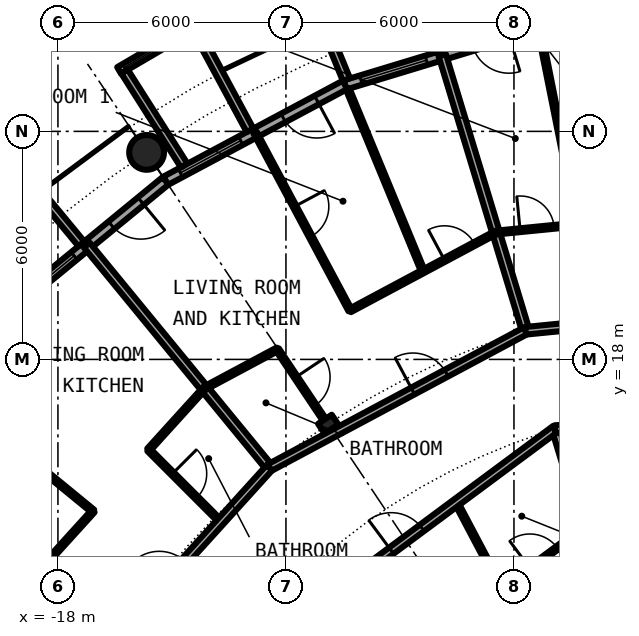
"""IFC4 building model, lengths in metres.
Left out: names, types, materials, properties, quantities, classifications, styles, units other than length and angle.
Written with IfcOpenShell. Run it as: python <this file> out.ifc"""

import sys

from ifc_helpers import new_model, si_unit, direction, frame, frame_2d, origin, origin_2d, place, context, subcontext, project, spatial, rectangle, circle, hollow_circle, i_section, extrude, element, fill, save


model = new_model("IFC4")
c1 = context("Model", 3, precision=1e-05, world=origin(), true_north=direction((0.0, 1.0)))
c2 = subcontext(c1, "Body", "Model", "MODEL_VIEW")
j1 = project(units=[si_unit("LENGTHUNIT", "METRE"), si_unit("PLANEANGLEUNIT", "RADIAN")], contexts=[c1])
p1 = place(None, origin())
s1 = spatial("IfcSite", under=j1, at=p1, CompositionType="ELEMENT")
p2 = place(p1, origin())
s2 = spatial("IfcBuilding", under=s1, at=p2, CompositionType="ELEMENT")
p3 = place(p2, frame((0.0, 0.0, 123.85)))
s3 = spatial("IfcBuildingStorey", under=s2, at=p3, CompositionType="ELEMENT", Elevation=123.85)
p4 = place(p3, frame((-15.667, 23.448, 0.0), z_axis=(0.0, 0.0, 1.0), x_axis=(1.0, 0.0, 0.0)))
e1 = element("IfcColumn", 1, at=p4, inside=s3, PredefinedType="COLUMN", context=c2, shape_type="SweptSolid", body=[
    extrude(hollow_circle(Radius=0.457, WallThickness=0.04, at=origin_2d()), origin(), (0.0, 0.0, 1.0), 3.05),
])
p5 = place(p3, frame((-10.889, 16.297, 0.0), z_axis=(0.0, 0.0, 1.0), x_axis=(-0.55557023302, 0.831469612303, 0.0)))
e2 = element("IfcColumn", 2, at=p5, inside=s3, PredefinedType="COLUMN", context=c2, shape_type="SweptSolid", body=[
    extrude(i_section(OverallWidth=0.307, OverallDepth=0.432, WebThickness=0.021, FlangeThickness=0.04, FilletRadius=0.027, at=origin_2d()), origin(), (0.0, 0.0, 1.0), 3.05),
])
p6 = place(p3, frame((-5.326, 26.775, 0.0), z_axis=(0.0, 0.0, 1.0), x_axis=(-0.956965678721, -0.290201119486, 0.0)))
e3 = element("IfcWall", 3, at=p6, inside=s3, PredefinedType="SOLIDWALL", context=c2, shape_type="SweptSolid", body=[
    extrude(rectangle(XDim=5.351, YDim=0.25, at=frame_2d((2.676, 0.0))), origin(), (0.0, 0.0, 1.0), 2.7),
])
p7 = place(p6, frame((0.841, 0.0, 0.0)))
e4 = element("IfcOpeningElement", 4, at=p7, cuts=e3, PredefinedType="OPENING", context=c2, shape_type="SweptSolid", body=[
    extrude(rectangle(XDim=1.0, YDim=2.2, at=frame_2d((0.5, 1.1))), frame((0.0, 0.135, 0.0), z_axis=(0.0, -1.0, 0.0), x_axis=(1.0, 0.0, 0.0)), (0.0, 0.0, 1.0), 0.27),
])
p8 = place(p6, frame((3.111, 0.0, 0.3)))
e5 = element("IfcOpeningElement", 5, at=p8, cuts=e3, PredefinedType="OPENING", context=c2, shape_type="SweptSolid", body=[
    extrude(rectangle(XDim=1.8, YDim=2.1, at=frame_2d((0.9, 1.05))), frame((0.0, 0.135, 0.0), z_axis=(0.0, -1.0, 0.0), x_axis=(1.0, 0.0, 0.0)), (0.0, 0.0, 1.0), 0.27),
])
p9 = place(p3, frame((-8.009, 26.092, -0.03), z_axis=(0.0, 0.0, 1.0), x_axis=(-0.293406695073, 0.955987715029, 0.0)))
e6 = element("IfcWall", 6, at=p9, inside=s3, PredefinedType="SOLIDWALL", context=c2, shape_type="SweptSolid", body=[
    extrude(rectangle(XDim=3.006, YDim=0.2, at=frame_2d((1.503, 0.0))), origin(), (0.0, 0.0, 1.0), 2.73),
])
p10 = place(p3, frame((-10.409, 25.364, -0.03), z_axis=(0.0, 0.0, 1.0), x_axis=(-0.379509886562, 0.925187681501, 0.0)))
e7 = element("IfcWall", 7, at=p10, inside=s3, PredefinedType="SOLIDWALL", context=c2, shape_type="SweptSolid", body=[
    extrude(rectangle(XDim=2.883, YDim=0.2, at=frame_2d((1.441, 0.0))), origin(), (0.0, 0.0, 1.0), 2.73),
])
p11 = place(p3, frame((-10.447, 25.222, 0.0), z_axis=(0.0, 0.0, 1.0), x_axis=(-0.881915646801, -0.471407246368, 0.0)))
e8 = element("IfcWall", 8, at=p11, inside=s3, PredefinedType="SOLIDWALL", context=c2, shape_type="SweptSolid", body=[
    extrude(rectangle(XDim=5.352, YDim=0.25, at=frame_2d((2.676, 0.0))), origin(), (0.0, 0.0, 1.0), 2.7),
])
p12 = place(p11, frame((0.841, 0.0, 0.0)))
e9 = element("IfcOpeningElement", 9, at=p12, cuts=e8, PredefinedType="OPENING", context=c2, shape_type="SweptSolid", body=[
    extrude(rectangle(XDim=1.0, YDim=2.2, at=frame_2d((0.5, 1.1))), frame((0.0, 0.135, 0.0), z_axis=(0.0, -1.0, 0.0), x_axis=(1.0, 0.0, 0.0)), (0.0, 0.0, 1.0), 0.27),
])
p13 = place(p11, frame((3.111, 0.0, 0.3)))
e10 = element("IfcOpeningElement", 10, at=p13, cuts=e8, PredefinedType="OPENING", context=c2, shape_type="SweptSolid", body=[
    extrude(rectangle(XDim=1.8, YDim=2.1, at=frame_2d((0.9, 1.05))), frame((0.0, 0.135, 0.0), z_axis=(0.0, -1.0, 0.0), x_axis=(1.0, 0.0, 0.0)), (0.0, 0.0, 1.0), 0.27),
])
p14 = place(p3, frame((-14.327, 26.812, -0.03), z_axis=(0.0, 0.0, 1.0), x_axis=(-0.862762477128, -0.505609442218, 0.0)))
e11 = element("IfcWall", 11, at=p14, inside=s3, PredefinedType="SOLIDWALL", context=c2, shape_type="SweptSolid", body=[
    extrude(rectangle(XDim=2.391, YDim=0.2, at=frame_2d((1.196, 0.0))), origin(), (0.0, 0.0, 1.0), 2.73),
])
p15 = place(p14, frame((0.156, 0.0, 0.33)))
e12 = element("IfcOpeningElement", 12, at=p15, cuts=e11, PredefinedType="OPENING", context=c2, shape_type="SweptSolid", body=[
    extrude(circle(Radius=1.04, at=frame_2d((1.04, 1.04))), frame((0.0, 0.11, 0.0), z_axis=(0.0, -1.0, 0.0), x_axis=(1.0, 0.0, 0.0)), (0.0, 0.0, 1.0), 0.22),
])
p16 = place(p3, frame((-12.945, 24.029, -0.03), z_axis=(0.0, 0.0, 1.0), x_axis=(-0.474424310775, 0.88029629861, 0.0)))
e13 = element("IfcWall", 13, at=p16, inside=s3, PredefinedType="SOLIDWALL", context=c2, shape_type="SweptSolid", body=[
    extrude(rectangle(XDim=3.006, YDim=0.2, at=frame_2d((1.503, 0.0))), origin(), (0.0, 0.0, 1.0), 2.73),
])
p17 = place(p3, frame((-14.678, 23.102, -0.03), z_axis=(0.0, 0.0, 1.0), x_axis=(-0.536001536573, 0.844217005746, 0.0)))
e14 = element("IfcWall", 14, at=p17, inside=s3, PredefinedType="SOLIDWALL", context=c2, shape_type="SweptSolid", body=[
    extrude(rectangle(XDim=2.929, YDim=0.2, at=frame_2d((1.465, 0.0))), origin(), (0.0, 0.0, 1.0), 2.73),
])
p18 = place(p3, frame((-15.167, 22.699, 0.0), z_axis=(0.0, 0.0, 1.0), x_axis=(-0.773019449054, -0.634382322723, 0.0)))
e15 = element("IfcWall", 15, at=p18, inside=s3, PredefinedType="SOLIDWALL", context=c2, shape_type="SweptSolid", body=[
    extrude(rectangle(XDim=5.352, YDim=0.25, at=frame_2d((2.676, 0.0))), origin(), (0.0, 0.0, 1.0), 2.7),
])
p19 = place(p18, frame((0.841, 0.0, 0.0)))
e16 = element("IfcOpeningElement", 16, at=p19, cuts=e15, PredefinedType="OPENING", context=c2, shape_type="SweptSolid", body=[
    extrude(rectangle(XDim=1.0, YDim=2.2, at=frame_2d((0.5, 1.1))), frame((0.0, 0.135, 0.0), z_axis=(0.0, -1.0, 0.0), x_axis=(1.0, 0.0, 0.0)), (0.0, 0.0, 1.0), 0.27),
])
p20 = place(p18, frame((3.111, 0.0, 0.3)))
e17 = element("IfcOpeningElement", 17, at=p20, cuts=e15, PredefinedType="OPENING", context=c2, shape_type="SweptSolid", body=[
    extrude(rectangle(XDim=1.8, YDim=2.1, at=frame_2d((0.9, 1.05))), frame((0.0, 0.135, 0.0), z_axis=(0.0, -1.0, 0.0), x_axis=(1.0, 0.0, 0.0)), (0.0, 0.0, 1.0), 0.27),
])
p21 = place(p3, frame((-17.384, 21.041, -0.03), z_axis=(0.0, 0.0, 1.0), x_axis=(-0.63709551667, 0.770784861449, 0.0)))
e18 = element("IfcWall", 18, at=p21, inside=s3, PredefinedType="SOLIDWALL", context=c2, shape_type="SweptSolid", body=[
    extrude(rectangle(XDim=3.006, YDim=0.2, at=frame_2d((1.503, 0.0))), origin(), (0.0, 0.0, 1.0), 2.73),
])
p22 = place(p3, frame((-7.887, 26.005, 0.0), z_axis=(0.0, 0.0, 1.0), x_axis=(0.29005838641, -0.957008951094, 0.0)))
e19 = element("IfcWall", 19, at=p22, inside=s3, PredefinedType="PARTITIONING", context=c2, shape_type="SweptSolid", body=[
    extrude(rectangle(XDim=7.574, YDim=0.2, at=frame_2d((3.787, 0.0))), origin(), (0.0, 0.0, 1.0), 2.7),
])
p23 = place(p3, frame((-4.907, 16.172, 0.0), z_axis=(0.0, 0.0, 1.0), x_axis=(0.289977130626, -0.957033575019, 0.0)))
e20 = element("IfcWall", 20, at=p23, inside=s3, PredefinedType="PARTITIONING", context=c2, shape_type="SweptSolid", body=[
    extrude(rectangle(XDim=9.18, YDim=0.2, at=frame_2d((4.59, 0.0))), origin(), (0.0, 0.0, 1.0), 2.7),
])
p24 = place(p3, frame((-22.595, 15.098, 0.0), z_axis=(0.0, 0.0, 1.0), x_axis=(0.831406593008, -0.555664536482, 0.0)))
e21 = element("IfcWall", 21, at=p24, inside=s3, PredefinedType="PARTITIONING", context=c2, shape_type="SweptSolid", body=[
    extrude(rectangle(XDim=7.358, YDim=0.2, at=frame_2d((3.679, 0.0))), origin(), (0.0, 0.0, 1.0), 2.7),
])
p25 = place(p3, frame((-21.012, 17.233, 0.0), z_axis=(0.0, 0.0, 1.0), x_axis=(0.77326214499, -0.634086472908, 0.0)))
e22 = element("IfcWall", 22, at=p25, inside=s3, PredefinedType="PARTITIONING", context=c2, shape_type="SweptSolid", body=[
    extrude(rectangle(XDim=5.089, YDim=0.1, at=frame_2d((2.544, 0.0))), origin(), (0.0, 0.0, 1.0), 2.7),
])
p26 = place(p25, frame((2.094, 0.0, 0.0)))
e23 = element("IfcOpeningElement", 23, at=p26, cuts=e22, PredefinedType="OPENING", context=c2, shape_type="SweptSolid", body=[
    extrude(rectangle(XDim=0.9, YDim=2.3, at=frame_2d((0.45, 1.15))), frame((0.0, 0.06, 0.0), z_axis=(0.0, -1.0, 0.0), x_axis=(1.0, 0.0, 0.0)), (0.0, 0.0, 1.0), 0.12),
])
p27 = place(p3, frame((-17.24, 21.007, 0.0), z_axis=(0.0, 0.0, 1.0), x_axis=(0.634381303318, -0.773020285633, 0.0)))
e24 = element("IfcWall", 24, at=p27, inside=s3, PredefinedType="PARTITIONING", context=c2, shape_type="SweptSolid", body=[
    extrude(rectangle(XDim=7.576, YDim=0.2, at=frame_2d((3.788, 0.0))), origin(), (0.0, 0.0, 1.0), 2.7),
])
p28 = place(p3, frame((-15.612, 15.622, 0.0), z_axis=(0.0, 0.0, 1.0), x_axis=(0.706741540154, -0.707471833659, 0.0)))
e25 = element("IfcWall", 25, at=p28, inside=s3, PredefinedType="PARTITIONING", context=c2, shape_type="SweptSolid", body=[
    extrude(rectangle(XDim=2.674, YDim=0.1, at=frame_2d((1.337, 0.0))), origin(), (0.0, 0.0, 1.0), 2.7),
])
p29 = place(p28, frame((0.887, 0.0, 0.0)))
e26 = element("IfcOpeningElement", 26, at=p29, cuts=e25, PredefinedType="OPENING", context=c2, shape_type="SweptSolid", body=[
    extrude(rectangle(XDim=0.9, YDim=2.3, at=frame_2d((0.45, 1.15))), frame((0.0, 0.06, 0.0), z_axis=(0.0, -1.0, 0.0), x_axis=(1.0, 0.0, 0.0)), (0.0, 0.0, 1.0), 0.12),
])
p30 = place(p3, frame((-12.81, 23.966, 0.0), z_axis=(0.0, 0.0, 1.0), x_axis=(0.47140999111, -0.881914179658, 0.0)))
e27 = element("IfcWall", 27, at=p30, inside=s3, PredefinedType="PARTITIONING", context=c2, shape_type="SweptSolid", body=[
    extrude(rectangle(XDim=5.303, YDim=0.1, at=frame_2d((2.652, 0.0))), origin(), (0.0, 0.0, 1.0), 2.7),
])
p31 = place(p30, frame((2.202, 0.0, 0.0)))
e28 = element("IfcOpeningElement", 28, at=p31, cuts=e27, PredefinedType="OPENING", context=c2, shape_type="SweptSolid", body=[
    extrude(rectangle(XDim=0.9, YDim=2.3, at=frame_2d((0.45, 1.15))), frame((0.0, 0.06, 0.0), z_axis=(0.0, -1.0, 0.0), x_axis=(1.0, 0.0, 0.0)), (0.0, 0.0, 1.0), 0.12),
])
p32 = place(p3, frame((-12.229, 18.264, 0.0), z_axis=(0.0, 0.0, 1.0), x_axis=(0.556469477731, -0.830868052313, 0.0)))
e29 = element("IfcWall", 29, at=p32, inside=s3, PredefinedType="PARTITIONING", context=c2, shape_type="SweptSolid", body=[
    extrude(rectangle(XDim=2.164, YDim=0.1, at=frame_2d((1.082, 0.0))), origin(), (0.0, 0.0, 1.0), 2.7),
])
p33 = place(p32, frame((0.881, 0.0, 0.0)))
e30 = element("IfcOpeningElement", 30, at=p33, cuts=e29, PredefinedType="OPENING", context=c2, shape_type="SweptSolid", body=[
    extrude(rectangle(XDim=0.9, YDim=2.3, at=frame_2d((0.45, 1.15))), frame((0.0, 0.06, 0.0), z_axis=(0.0, -1.0, 0.0), x_axis=(1.0, 0.0, 0.0)), (0.0, 0.0, 1.0), 0.12),
])
p34 = place(p3, frame((-10.375, 25.116, 0.0), z_axis=(0.0, 0.0, 1.0), x_axis=(0.381673756215, -0.924297107978, 0.0)))
e31 = element("IfcWall", 31, at=p34, inside=s3, PredefinedType="PARTITIONING", context=c2, shape_type="SweptSolid", body=[
    extrude(rectangle(XDim=5.195, YDim=0.1, at=frame_2d((2.598, 0.0))), origin(), (0.0, 0.0, 1.0), 2.7),
])
p35 = place(p3, frame((-7.519, 14.234, 0.0), z_axis=(0.0, 0.0, 1.0), x_axis=(0.467001992543, -0.884256263173, 0.0)))
e32 = element("IfcWall", 32, at=p35, inside=s3, PredefinedType="PARTITIONING", context=c2, shape_type="SweptSolid", body=[
    extrude(rectangle(XDim=2.572, YDim=0.1, at=frame_2d((1.286, 0.0))), origin(), (0.0, 0.0, 1.0), 2.7),
])
p36 = place(p3, frame((-5.327, 26.648, 0.0), z_axis=(0.0, 0.0, 1.0), x_axis=(0.195899255693, -0.980624026638, 0.0)))
e33 = element("IfcWall", 33, at=p36, inside=s3, PredefinedType="PARTITIONING", context=c2, shape_type="SweptSolid", body=[
    extrude(rectangle(XDim=5.196, YDim=0.1, at=frame_2d((2.598, 0.0))), origin(), (0.0, 0.0, 1.0), 2.7),
])
p37 = place(p3, frame((-6.318, 11.96, 0.0), z_axis=(0.0, 0.0, 1.0), x_axis=(0.803128348509, 0.595806055542, 0.0)))
e34 = element("IfcWall", 34, at=p37, inside=s3, PredefinedType="PARTITIONING", context=c2, shape_type="SweptSolid", body=[
    extrude(rectangle(XDim=2.734, YDim=0.1, at=frame_2d((1.367, 0.0))), origin(), (0.0, 0.0, 1.0), 2.7),
])
p38 = place(p37, frame((0.917, 0.0, 0.0)))
e35 = element("IfcOpeningElement", 35, at=p38, cuts=e34, PredefinedType="OPENING", context=c2, shape_type="SweptSolid", body=[
    extrude(rectangle(XDim=0.9, YDim=2.3, at=frame_2d((0.45, 1.15))), frame((0.0, 0.06, 0.0), z_axis=(0.0, -1.0, 0.0), x_axis=(1.0, 0.0, 0.0)), (0.0, 0.0, 1.0), 0.12),
])
p39 = place(p3, frame((-12.745, 10.358, 0.0), z_axis=(0.0, 0.0, 1.0), x_axis=(0.803191461888, 0.595720971219, 0.0)))
e36 = element("IfcWall", 36, at=p39, inside=s3, PredefinedType="PARTITIONING", context=c2, shape_type="SweptSolid", body=[
    extrude(rectangle(XDim=9.76, YDim=0.2, at=frame_2d((4.88, 0.0))), origin(), (0.0, 0.0, 1.0), 2.7),
])
p40 = place(p39, frame((4.38, 0.0, 0.0)))
e37 = element("IfcOpeningElement", 37, at=p40, cuts=e36, PredefinedType="OPENING", context=c2, shape_type="SweptSolid", body=[
    extrude(rectangle(XDim=1.0, YDim=2.3, at=frame_2d((0.5, 1.15))), frame((0.0, 0.11, 0.0), z_axis=(0.0, -1.0, 0.0), x_axis=(1.0, 0.0, 0.0)), (0.0, 0.0, 1.0), 0.22),
])
p41 = place(p3, frame((-4.921, 16.167, 0.0), z_axis=(0.0, 0.0, 1.0), x_axis=(0.998754043059, 0.049903521659, 0.0)))
e38 = element("IfcWall", 38, at=p41, inside=s3, PredefinedType="PARTITIONING", context=c2, shape_type="SweptSolid", body=[
    extrude(rectangle(XDim=8.214, YDim=0.2, at=frame_2d((4.107, 0.0))), origin(), (0.0, 0.0, 1.0), 2.7),
])
p42 = place(p41, frame((3.614, 0.0, 0.0)))
e39 = element("IfcOpeningElement", 39, at=p42, cuts=e38, PredefinedType="OPENING", context=c2, shape_type="SweptSolid", body=[
    extrude(rectangle(XDim=1.0, YDim=2.3, at=frame_2d((0.5, 1.15))), frame((0.0, 0.11, 0.0), z_axis=(0.0, -1.0, 0.0), x_axis=(1.0, 0.0, 0.0)), (0.0, 0.0, 1.0), 0.22),
])
p43 = place(p3, frame((-12.434, 15.151, 0.0), z_axis=(0.0, 0.0, 1.0), x_axis=(0.8819312112, 0.471378127104, 0.0)))
e40 = element("IfcWall", 40, at=p43, inside=s3, PredefinedType="PARTITIONING", context=c2, shape_type="SweptSolid", body=[
    extrude(rectangle(XDim=7.65, YDim=0.2, at=frame_2d((3.825, 0.0))), origin(), (0.0, 0.0, 1.0), 2.39),
])
p44 = place(p43, frame((4.279, 0.0, 0.0)))
e41 = element("IfcOpeningElement", 41, at=p44, cuts=e40, PredefinedType="OPENING", context=c2, shape_type="SweptSolid", body=[
    extrude(rectangle(XDim=1.0, YDim=2.3, at=frame_2d((0.5, 1.15))), frame((0.0, 0.11, 0.0), z_axis=(0.0, -1.0, 0.0), x_axis=(1.0, 0.0, 0.0)), (0.0, 0.0, 1.0), 0.22),
])
p45 = place(p3, frame((-5.696, 18.753, 0.0), z_axis=(0.0, 0.0, 1.0), x_axis=(0.995146797279, 0.098401483048, 0.0)))
e42 = element("IfcWall", 42, at=p45, inside=s3, PredefinedType="PARTITIONING", context=c2, shape_type="SweptSolid", body=[
    extrude(rectangle(XDim=7.654, YDim=0.2, at=frame_2d((3.827, 0.0))), origin(), (0.0, 0.0, 1.0), 2.39),
])
p46 = place(p45, frame((2.556, 0.0, 0.0)))
e43 = element("IfcOpeningElement", 43, at=p46, cuts=e42, PredefinedType="OPENING", context=c2, shape_type="SweptSolid", body=[
    extrude(rectangle(XDim=1.0, YDim=2.3, at=frame_2d((0.5, 1.15))), frame((0.0, 0.11, 0.0), z_axis=(0.0, -1.0, 0.0), x_axis=(1.0, 0.0, 0.0)), (0.0, 0.0, 1.0), 0.22),
])
p47 = place(p3, frame((-16.192, 11.004, 0.0), z_axis=(0.0, 0.0, 1.0), x_axis=(0.671481997275, 0.741020868354, 0.0)))
e44 = element("IfcWall", 44, at=p47, inside=s3, PredefinedType="PARTITIONING", context=c2, shape_type="SweptSolid", body=[
    extrude(rectangle(XDim=5.596, YDim=0.2, at=frame_2d((2.798, 0.0))), origin(), (0.0, 0.0, 1.0), 2.39),
])
p48 = place(p47, frame((1.277, 0.0, 0.0)))
e45 = element("IfcOpeningElement", 45, at=p48, cuts=e44, PredefinedType="OPENING", context=c2, shape_type="SweptSolid", body=[
    extrude(rectangle(XDim=1.0, YDim=2.3, at=frame_2d((0.5, 1.15))), frame((0.0, 0.11, 0.0), z_axis=(0.0, -1.0, 0.0), x_axis=(1.0, 0.0, 0.0)), (0.0, 0.0, 1.0), 0.22),
])
p49 = place(p3, frame((-14.141, 17.241, 0.0), z_axis=(0.0, 0.0, 1.0), x_axis=(0.881765102974, 0.47168877788, 0.0)))
e46 = element("IfcWall", 46, at=p49, inside=s3, PredefinedType="PARTITIONING", context=c2, shape_type="SweptSolid", body=[
    extrude(rectangle(XDim=2.176, YDim=0.1, at=frame_2d((1.088, 0.0))), origin(), (0.0, 0.0, 1.0), 2.7),
])
p50 = place(p3, frame((-10.312, 19.288, 0.0), z_axis=(0.0, 0.0, 1.0), x_axis=(0.881932070463, 0.471376519451, 0.0)))
e47 = element("IfcWall", 47, at=p50, inside=s3, PredefinedType="PARTITIONING", context=c2, shape_type="SweptSolid", body=[
    extrude(rectangle(XDim=4.355, YDim=0.1, at=frame_2d((2.178, 0.0))), origin(), (0.0, 0.0, 1.0), 2.7),
])
p51 = place(p50, frame((2.816, 0.0, 0.0)))
e48 = element("IfcOpeningElement", 48, at=p51, cuts=e47, PredefinedType="OPENING", context=c2, shape_type="SweptSolid", body=[
    extrude(rectangle(XDim=0.9, YDim=2.3, at=frame_2d((0.45, 1.15))), frame((0.0, 0.06, 0.0), z_axis=(0.0, -1.0, 0.0), x_axis=(1.0, 0.0, 0.0)), (0.0, 0.0, 1.0), 0.12),
])
p52 = place(p3, frame((-6.482, 21.336, 0.0), z_axis=(0.0, 0.0, 1.0), x_axis=(0.995148257168, 0.098386717885, 0.0)))
e49 = element("IfcWall", 49, at=p52, inside=s3, PredefinedType="PARTITIONING", context=c2, shape_type="SweptSolid", body=[
    extrude(rectangle(XDim=4.35, YDim=0.1, at=frame_2d((2.175, 0.0))), origin(), (0.0, 0.0, 1.0), 2.7),
])
p53 = place(p52, frame((0.647, 0.0, 0.0)))
e50 = element("IfcOpeningElement", 50, at=p53, cuts=e49, PredefinedType="OPENING", context=c2, shape_type="SweptSolid", body=[
    extrude(rectangle(XDim=0.9, YDim=2.3, at=frame_2d((0.45, 1.15))), frame((0.0, 0.06, 0.0), z_axis=(0.0, -1.0, 0.0), x_axis=(1.0, 0.0, 0.0)), (0.0, 0.0, 1.0), 0.12),
])
for number, where, z_axis, x_axis in (
    (51, (-18.538, 12.394, 0.0), (0.0, 0.0, 1.0), (0.672, 0.741, 0.0)),
    (52, (-15.613, 15.621, 0.0), (0.0, 0.0, 1.0), (0.672, 0.741, 0.0)),
):
    element("IfcWall", number, at=place(p3, frame(where, z_axis=z_axis, x_axis=x_axis)), inside=s3, PredefinedType="PARTITIONING", context=c2, shape_type="SweptSolid", body=[
        extrude(rectangle(XDim=2.183, YDim=0.1, at=frame_2d((1.091, 0.0))), origin(), (0.0, 0.0, 1.0), 2.7),
    ])
p54 = place(p8, origin())
e53 = element("IfcWindow", 53, at=p54, inside=s3, PartitioningType="SINGLE_PANEL", PredefinedType="WINDOW", context=c2, shape_type="SweptSolid", body=[
    extrude(rectangle(XDim=1.8, YDim=2.1, at=frame_2d((0.9, 1.05))), frame((0.0, 0.03, 0.0), z_axis=(0.0, -1.0, 0.0), x_axis=(1.0, 0.0, 0.0)), (0.0, 0.0, 1.0), 0.06),
])
fill(e5, e53)
p55 = place(p12, origin())
e54 = element("IfcDoor", 54, at=p55, inside=s3, OperationType="SINGLE_SWING_LEFT", PredefinedType="DOOR", context=c2, shape_type="SweptSolid", body=[
    extrude(rectangle(XDim=1.0, YDim=2.2, at=frame_2d((0.5, 1.1))), frame((0.0, 0.025, 0.0), z_axis=(0.0, -1.0, 0.0), x_axis=(1.0, 0.0, 0.0)), (0.0, 0.0, 1.0), 0.05),
])
fill(e9, e54)
p56 = place(p13, origin())
e55 = element("IfcWindow", 55, at=p56, inside=s3, PartitioningType="SINGLE_PANEL", PredefinedType="WINDOW", context=c2, shape_type="SweptSolid", body=[
    extrude(rectangle(XDim=1.8, YDim=2.1, at=frame_2d((0.9, 1.05))), frame((0.0, 0.03, 0.0), z_axis=(0.0, -1.0, 0.0), x_axis=(1.0, 0.0, 0.0)), (0.0, 0.0, 1.0), 0.06),
])
fill(e10, e55)
p57 = place(p15, origin())
e56 = element("IfcWindow", 56, at=p57, inside=s3, PartitioningType="SINGLE_PANEL", PredefinedType="WINDOW", context=c2, shape_type="SweptSolid", body=[
    extrude(circle(Radius=1.04, at=frame_2d((1.04, 1.04))), frame((0.0, 0.03, 0.0), z_axis=(0.0, -1.0, 0.0), x_axis=(1.0, 0.0, 0.0)), (0.0, 0.0, 1.0), 0.06),
])
fill(e12, e56)
p58 = place(p19, origin())
e57 = element("IfcDoor", 57, at=p58, inside=s3, OperationType="SINGLE_SWING_LEFT", PredefinedType="DOOR", context=c2, shape_type="SweptSolid", body=[
    extrude(rectangle(XDim=1.0, YDim=2.2, at=frame_2d((0.5, 1.1))), frame((0.0, 0.025, 0.0), z_axis=(0.0, -1.0, 0.0), x_axis=(1.0, 0.0, 0.0)), (0.0, 0.0, 1.0), 0.05),
])
fill(e16, e57)
p59 = place(p20, origin())
e58 = element("IfcWindow", 58, at=p59, inside=s3, PartitioningType="SINGLE_PANEL", PredefinedType="WINDOW", context=c2, shape_type="SweptSolid", body=[
    extrude(rectangle(XDim=1.8, YDim=2.1, at=frame_2d((0.9, 1.05))), frame((0.0, 0.03, 0.0), z_axis=(0.0, -1.0, 0.0), x_axis=(1.0, 0.0, 0.0)), (0.0, 0.0, 1.0), 0.06),
])
fill(e17, e58)
p60 = place(p53, origin())
e59 = element("IfcDoor", 59, at=p60, inside=s3, OperationType="SINGLE_SWING_LEFT", PredefinedType="DOOR", context=c2, shape_type="SweptSolid", body=[
    extrude(rectangle(XDim=0.9, YDim=2.3, at=frame_2d((0.45, 1.15))), frame((0.0, 0.025, 0.0), z_axis=(0.0, -1.0, 0.0), x_axis=(1.0, 0.0, 0.0)), (0.0, 0.0, 1.0), 0.05),
])
fill(e50, e59)
p61 = place(p44, origin())
e60 = element("IfcDoor", 60, at=p61, inside=s3, OperationType="SINGLE_SWING_RIGHT", PredefinedType="DOOR", context=c2, shape_type="SweptSolid", body=[
    extrude(rectangle(XDim=1.0, YDim=2.3, at=frame_2d((0.5, 1.15))), frame((0.0, 0.025, 0.0), z_axis=(0.0, -1.0, 0.0), x_axis=(1.0, 0.0, 0.0)), (0.0, 0.0, 1.0), 0.05),
])
fill(e41, e60)
p62 = place(p33, origin())
e61 = element("IfcDoor", 61, at=p62, inside=s3, OperationType="SINGLE_SWING_RIGHT", PredefinedType="DOOR", context=c2, shape_type="SweptSolid", body=[
    extrude(rectangle(XDim=0.9, YDim=2.3, at=frame_2d((0.45, 1.15))), frame((0.0, 0.025, 0.0), z_axis=(0.0, -1.0, 0.0), x_axis=(1.0, 0.0, 0.0)), (0.0, 0.0, 1.0), 0.05),
])
fill(e30, e61)
p63 = place(p31, origin())
e62 = element("IfcDoor", 62, at=p63, inside=s3, OperationType="SINGLE_SWING_RIGHT", PredefinedType="DOOR", context=c2, shape_type="SweptSolid", body=[
    extrude(rectangle(XDim=0.9, YDim=2.3, at=frame_2d((0.45, 1.15))), frame((0.0, 0.025, 0.0), z_axis=(0.0, -1.0, 0.0), x_axis=(1.0, 0.0, 0.0)), (0.0, 0.0, 1.0), 0.05),
])
fill(e28, e62)
p64 = place(p51, origin())
e63 = element("IfcDoor", 63, at=p64, inside=s3, OperationType="SINGLE_SWING_RIGHT", PredefinedType="DOOR", context=c2, shape_type="SweptSolid", body=[
    extrude(rectangle(XDim=0.9, YDim=2.3, at=frame_2d((0.45, 1.15))), frame((0.0, 0.025, 0.0), z_axis=(0.0, -1.0, 0.0), x_axis=(1.0, 0.0, 0.0)), (0.0, 0.0, 1.0), 0.05),
])
fill(e48, e63)
p65 = place(p29, origin())
e64 = element("IfcDoor", 64, at=p65, inside=s3, OperationType="SINGLE_SWING_RIGHT", PredefinedType="DOOR", context=c2, shape_type="SweptSolid", body=[
    extrude(rectangle(XDim=0.9, YDim=2.3, at=frame_2d((0.45, 1.15))), frame((0.0, 0.025, 0.0), z_axis=(0.0, -1.0, 0.0), x_axis=(1.0, 0.0, 0.0)), (0.0, 0.0, 1.0), 0.05),
])
fill(e26, e64)
p66 = place(p40, origin())
e65 = element("IfcDoor", 65, at=p66, inside=s3, OperationType="SINGLE_SWING_RIGHT", PredefinedType="DOOR", context=c2, shape_type="SweptSolid", body=[
    extrude(rectangle(XDim=1.0, YDim=2.3, at=frame_2d((0.5, 1.15))), frame((0.0, 0.025, 0.0), z_axis=(0.0, -1.0, 0.0), x_axis=(1.0, 0.0, 0.0)), (0.0, 0.0, 1.0), 0.05),
])
fill(e37, e65)
p67 = place(p38, origin())
e66 = element("IfcDoor", 66, at=p67, inside=s3, OperationType="SINGLE_SWING_RIGHT", PredefinedType="DOOR", context=c2, shape_type="SweptSolid", body=[
    extrude(rectangle(XDim=0.9, YDim=2.3, at=frame_2d((0.45, 1.15))), frame((0.0, 0.025, 0.0), z_axis=(0.0, -1.0, 0.0), x_axis=(1.0, 0.0, 0.0)), (0.0, 0.0, 1.0), 0.05),
])
fill(e35, e66)
save(model, sys.argv[1])
